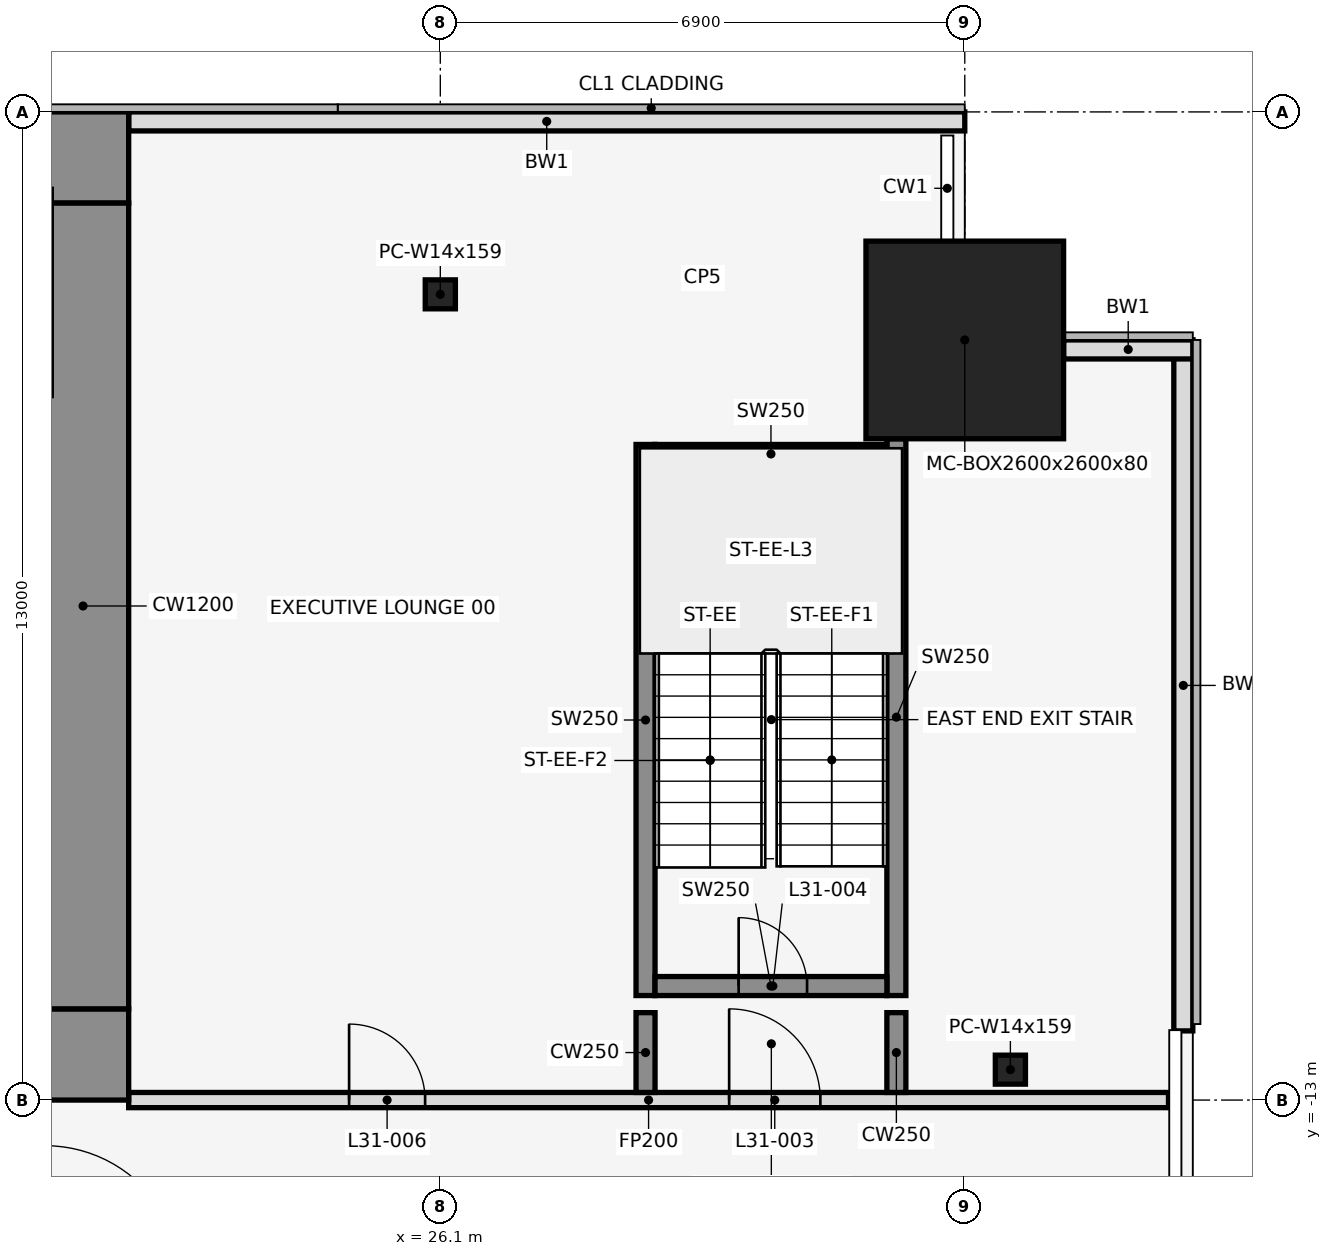
"""IFC4 building model, lengths in metres.
Left out: names, types, materials, properties, quantities, classifications, styles, units other than length and angle.
Written with IfcOpenShell. Run it as: python <this file> out.ifc"""

import sys

from ifc_helpers import new_model, si_unit, direction, frame, frame_2d, origin, origin_2d, place, context, subcontext, project, spatial, rectangle, hollow_rectangle, i_section, extrude, element, fill, save


model = new_model("IFC4")
c1 = context("Model", 3, precision=1e-05, world=origin(), true_north=direction((0.0, 1.0)))
c2 = subcontext(c1, "Body", "Model", "MODEL_VIEW")
j1 = project(units=[si_unit("LENGTHUNIT", "METRE"), si_unit("PLANEANGLEUNIT", "RADIAN")], contexts=[c1])
p1 = place(None, origin())
s1 = spatial("IfcSite", under=j1, at=p1, CompositionType="ELEMENT")
p2 = place(p1, origin())
s2 = spatial("IfcBuilding", under=s1, at=p2, CompositionType="ELEMENT")
p3 = place(p2, frame((0.0, 0.0, 144.5)))
s3 = spatial("IfcBuildingStorey", under=s2, at=p3, CompositionType="ELEMENT", Elevation=144.5)
p4 = place(p3, frame((26.1, -2.4, 0.0), z_axis=(0.0, 0.0, 1.0), x_axis=(1.0, 0.0, 0.0)))
e1 = element("IfcColumn", 1, at=p4, inside=s3, PredefinedType="COLUMN", context=c2, shape_type="SweptSolid", body=[
    extrude(i_section(OverallWidth=0.396, OverallDepth=0.381, WebThickness=0.019, FlangeThickness=0.03, at=origin_2d()), origin(), (0.0, 0.0, 1.0), 4.1),
])
p5 = place(p3, frame((33.0, -3.0, 0.0), z_axis=(0.0, 0.0, 1.0), x_axis=(1.0, 0.0, 0.0)))
e2 = element("IfcColumn", 2, at=p5, inside=s3, PredefinedType="COLUMN", context=c2, shape_type="SweptSolid", body=[
    extrude(hollow_rectangle(XDim=2.6, YDim=2.6, WallThickness=0.08, at=origin_2d()), origin(), (0.0, 0.0, 1.0), 4.1),
])
p6 = place(p3, frame((33.6, -12.6, 0.0), z_axis=(0.0, 0.0, 1.0), x_axis=(1.0, 0.0, 0.0)))
e3 = element("IfcColumn", 3, at=p6, inside=s3, PredefinedType="COLUMN", context=c2, shape_type="SweptSolid", body=[
    extrude(i_section(OverallWidth=0.396, OverallDepth=0.381, WebThickness=0.019, FlangeThickness=0.03, at=origin_2d()), origin(), (0.0, 0.0, 1.0), 4.1),
])
p7 = place(p3, frame((33.0, -0.125, 0.0), z_axis=(0.0, 0.0, 1.0), x_axis=(-1.0, 0.0, 0.0)))
e4 = element("IfcWall", 4, at=p7, inside=s3, PredefinedType="STANDARD", context=c2, shape_type="SweptSolid", body=[
    extrude(rectangle(XDim=11.0, YDim=0.25, at=frame_2d((5.5, 0.0))), origin(), (0.0, 0.0, 1.0), 3.95),
])
p8 = place(p3, frame((35.875, -12.09, 0.0), z_axis=(0.0, 0.0, 1.0), x_axis=(0.0, 1.0, 0.0)))
e5 = element("IfcWall", 5, at=p8, inside=s3, PredefinedType="STANDARD", context=c2, shape_type="SweptSolid", body=[
    extrude(rectangle(XDim=9.09, YDim=0.25, at=frame_2d((4.545, 0.0))), origin(), (0.0, 0.0, 1.0), 3.95),
])
p9 = place(p3, frame((36.0, -3.125, 0.0), z_axis=(0.0, 0.0, 1.0), x_axis=(-1.0, 0.0, 0.0)))
e6 = element("IfcWall", 6, at=p9, inside=s3, PredefinedType="STANDARD", context=c2, shape_type="SweptSolid", body=[
    extrude(rectangle(XDim=1.7, YDim=0.25, at=frame_2d((0.85, 0.0))), origin(), (0.0, 0.0, 1.0), 3.95),
])
p10 = place(p3, frame((28.8, -11.625, 0.0), z_axis=(0.0, 0.0, 1.0), x_axis=(0.0, 1.0, 0.0)))
e7 = element("IfcWall", 7, at=p10, inside=s3, PredefinedType="SHEAR", context=c2, shape_type="SweptSolid", body=[
    extrude(rectangle(XDim=7.25, YDim=0.25, at=frame_2d((3.625, 0.0))), origin(), (0.0, 0.0, 1.0), 4.1),
])
p11 = place(p3, frame((32.1, -11.625, 0.0), z_axis=(0.0, 0.0, 1.0), x_axis=(0.0, 1.0, 0.0)))
e8 = element("IfcWall", 8, at=p11, inside=s3, PredefinedType="SHEAR", context=c2, shape_type="SweptSolid", body=[
    extrude(rectangle(XDim=7.325, YDim=0.25, at=frame_2d((3.663, 0.0))), origin(), (0.0, 0.0, 1.0), 4.1),
])
p12 = place(p3, frame((28.925, -11.5, 0.0), z_axis=(0.0, 0.0, 1.0), x_axis=(1.0, 0.0, 0.0)))
e9 = element("IfcWall", 9, at=p12, inside=s3, PredefinedType="SHEAR", context=c2, shape_type="SweptSolid", body=[
    extrude(rectangle(XDim=3.05, YDim=0.25, at=frame_2d((1.525, 0.0))), origin(), (0.0, 0.0, 1.0), 4.1),
])
p13 = place(p12, frame((1.1, 0.0, 0.0)))
e10 = element("IfcOpeningElement", 10, at=p13, cuts=e9, PredefinedType="OPENING", context=c2, shape_type="SweptSolid", body=[
    extrude(rectangle(XDim=0.9, YDim=2.1, at=frame_2d((0.45, 1.05))), frame((0.0, 0.137, 0.0), z_axis=(0.0, -1.0, 0.0), x_axis=(1.0, 0.0, 0.0)), (0.0, 0.0, 1.0), 0.274),
])
p14 = place(p3, frame((28.925, -4.5, 0.0), z_axis=(0.0, 0.0, 1.0), x_axis=(1.0, 0.0, 0.0)))
e11 = element("IfcWall", 11, at=p14, inside=s3, PredefinedType="SHEAR", context=c2, shape_type="SweptSolid", body=[
    extrude(rectangle(XDim=3.05, YDim=0.25, at=frame_2d((1.525, 0.0))), origin(), (0.0, 0.0, 1.0), 4.1),
])
p15 = place(p3, frame((22.0, -13.0, 0.0), z_axis=(0.0, 0.0, 1.0), x_axis=(1.0, 0.0, 0.0)))
e12 = element("IfcWall", 12, at=p15, inside=s3, PredefinedType="PARTITIONING", context=c2, shape_type="SweptSolid", body=[
    extrude(rectangle(XDim=13.68, YDim=0.2, at=frame_2d((6.84, 0.0))), origin(), (0.0, 0.0, 1.0), 2.84),
])
p16 = place(p15, frame((7.9, 0.0, 0.0)))
e13 = element("IfcOpeningElement", 13, at=p16, cuts=e12, PredefinedType="OPENING", context=c2, shape_type="SweptSolid", body=[
    extrude(rectangle(XDim=1.2, YDim=2.1, at=frame_2d((0.6, 1.05))), frame((0.0, 0.112, 0.0), z_axis=(0.0, -1.0, 0.0), x_axis=(1.0, 0.0, 0.0)), (0.0, 0.0, 1.0), 0.224),
])
p17 = place(p15, frame((2.9, 0.0, 0.0)))
e14 = element("IfcOpeningElement", 14, at=p17, cuts=e12, PredefinedType="OPENING", context=c2, shape_type="SweptSolid", body=[
    extrude(rectangle(XDim=1.0, YDim=2.1, at=frame_2d((0.5, 1.05))), frame((0.0, 0.112, 0.0), z_axis=(0.0, -1.0, 0.0), x_axis=(1.0, 0.0, 0.0)), (0.0, 0.0, 1.0), 0.224),
])
for number, where, z_axis, x_axis in (
    (15, (28.8, -12.9, 0.0), (0.0, 0.0, 1.0), (0.0, 1.0, 0.0)),
    (16, (32.1, -12.9, 0.0), (0.0, 0.0, 1.0), (0.0, 1.0, 0.0)),
):
    element("IfcWall", number, at=place(p3, frame(where, z_axis=z_axis, x_axis=x_axis)), inside=s3, PredefinedType="SHEAR", context=c2, shape_type="SweptSolid", body=[
        extrude(rectangle(XDim=1.05, YDim=0.25, at=frame_2d((0.525, 0.0))), origin(), (0.0, 0.0, 1.0), 4.1),
    ])
p18 = place(p3, frame((-22.0, -0.6, 0.0), z_axis=(0.0, 0.0, 1.0), x_axis=(1.0, 0.0, 0.0)))
e17 = element("IfcWall", 17, at=p18, inside=s3, PredefinedType="SHEAR", context=c2, shape_type="SweptSolid", body=[
    extrude(rectangle(XDim=44.0, YDim=1.2, at=frame_2d((22.0, 0.0))), origin(), (0.0, 0.0, 1.0), 4.1),
])
p19 = place(p18, frame((18.55, 0.0, 0.0)))
e18 = element("IfcOpeningElement", 18, at=p19, cuts=e17, PredefinedType="OPENING", context=c2, shape_type="SweptSolid", body=[
    extrude(rectangle(XDim=0.9, YDim=2.1, at=frame_2d((0.45, 1.05))), frame((0.0, 0.612, 0.0), z_axis=(0.0, -1.0, 0.0), x_axis=(1.0, 0.0, 0.0)), (0.0, 0.0, 1.0), 1.224),
])
p20 = place(p18, frame((24.55, 0.0, 0.0)))
e19 = element("IfcOpeningElement", 19, at=p20, cuts=e17, PredefinedType="OPENING", context=c2, shape_type="SweptSolid", body=[
    extrude(rectangle(XDim=0.9, YDim=2.1, at=frame_2d((0.45, 1.05))), frame((0.0, 0.612, 0.0), z_axis=(0.0, -1.0, 0.0), x_axis=(1.0, 0.0, 0.0)), (0.0, 0.0, 1.0), 1.224),
])
p21 = place(p3, frame((-22.0, -12.4, 0.0), z_axis=(0.0, 0.0, 1.0), x_axis=(1.0, 0.0, 0.0)))
e20 = element("IfcWall", 20, at=p21, inside=s3, PredefinedType="SHEAR", context=c2, shape_type="SweptSolid", body=[
    extrude(rectangle(XDim=44.0, YDim=1.2, at=frame_2d((22.0, 0.0))), origin(), (0.0, 0.0, 1.0), 4.1),
])
p22 = place(p21, frame((2.2, 0.0, 0.0)))
e21 = element("IfcOpeningElement", 21, at=p22, cuts=e20, PredefinedType="OPENING", context=c2, shape_type="SweptSolid", body=[
    extrude(rectangle(XDim=1.2, YDim=2.1, at=frame_2d((0.6, 1.05))), frame((0.0, 0.612, 0.0), z_axis=(0.0, -1.0, 0.0), x_axis=(1.0, 0.0, 0.0)), (0.0, 0.0, 1.0), 1.224),
])
p23 = place(p21, frame((21.4, 0.0, 0.0)))
e22 = element("IfcOpeningElement", 22, at=p23, cuts=e20, PredefinedType="OPENING", context=c2, shape_type="SweptSolid", body=[
    extrude(rectangle(XDim=1.2, YDim=2.1, at=frame_2d((0.6, 1.05))), frame((0.0, 0.612, 0.0), z_axis=(0.0, -1.0, 0.0), x_axis=(1.0, 0.0, 0.0)), (0.0, 0.0, 1.0), 1.224),
])
p24 = place(p21, frame((40.6, 0.0, 0.0)))
e23 = element("IfcOpeningElement", 23, at=p24, cuts=e20, PredefinedType="OPENING", context=c2, shape_type="SweptSolid", body=[
    extrude(rectangle(XDim=1.2, YDim=2.1, at=frame_2d((0.6, 1.05))), frame((0.0, 0.612, 0.0), z_axis=(0.0, -1.0, 0.0), x_axis=(1.0, 0.0, 0.0)), (0.0, 0.0, 1.0), 1.224),
])
p25 = place(p21, frame((16.0, 0.0, 0.0)))
e24 = element("IfcOpeningElement", 24, at=p25, cuts=e20, PredefinedType="OPENING", context=c2, shape_type="SweptSolid", body=[
    extrude(rectangle(XDim=1.8, YDim=2.1, at=frame_2d((0.9, 1.05))), frame((0.0, 0.612, 0.0), z_axis=(0.0, -1.0, 0.0), x_axis=(1.0, 0.0, 0.0)), (0.0, 0.0, 1.0), 1.224),
])
p26 = place(p21, frame((6.3, 0.0, 0.0)))
e25 = element("IfcOpeningElement", 25, at=p26, cuts=e20, PredefinedType="OPENING", context=c2, shape_type="SweptSolid", body=[
    extrude(rectangle(XDim=1.2, YDim=2.1, at=frame_2d((0.6, 1.05))), frame((0.0, 0.612, 0.0), z_axis=(0.0, -1.0, 0.0), x_axis=(1.0, 0.0, 0.0)), (0.0, 0.0, 1.0), 1.224),
])
p27 = place(p21, frame((26.2, 0.0, 0.0)))
e26 = element("IfcOpeningElement", 26, at=p27, cuts=e20, PredefinedType="OPENING", context=c2, shape_type="SweptSolid", body=[
    extrude(rectangle(XDim=1.8, YDim=2.1, at=frame_2d((0.9, 1.05))), frame((0.0, 0.612, 0.0), z_axis=(0.0, -1.0, 0.0), x_axis=(1.0, 0.0, 0.0)), (0.0, 0.0, 1.0), 1.224),
])
p28 = place(p21, frame((36.5, 0.0, 0.0)))
e27 = element("IfcOpeningElement", 27, at=p28, cuts=e20, PredefinedType="OPENING", context=c2, shape_type="SweptSolid", body=[
    extrude(rectangle(XDim=1.2, YDim=2.1, at=frame_2d((0.6, 1.05))), frame((0.0, 0.612, 0.0), z_axis=(0.0, -1.0, 0.0), x_axis=(1.0, 0.0, 0.0)), (0.0, 0.0, 1.0), 1.224),
])
p29 = place(p3, frame((21.4, -11.8, 0.0), z_axis=(0.0, 0.0, 1.0), x_axis=(0.0, 1.0, 0.0)))
e28 = element("IfcWall", 28, at=p29, inside=s3, PredefinedType="SHEAR", context=c2, shape_type="SweptSolid", body=[
    extrude(rectangle(XDim=10.6, YDim=1.2, at=frame_2d((5.3, 0.0))), origin(), (0.0, 0.0, 1.0), 4.1),
])
p30 = place(p16, origin())
e29 = element("IfcDoor", 29, at=p30, inside=s3, OperationType="SINGLE_SWING_RIGHT", PredefinedType="DOOR", context=c2, shape_type="SweptSolid", body=[
    extrude(rectangle(XDim=1.2, YDim=2.1, at=frame_2d((0.6, 1.05))), frame((0.0, 0.025, 0.0), z_axis=(0.0, -1.0, 0.0), x_axis=(1.0, 0.0, 0.0)), (0.0, 0.0, 1.0), 0.05),
])
fill(e13, e29)
p31 = place(p13, origin())
e30 = element("IfcDoor", 30, at=p31, inside=s3, OperationType="SINGLE_SWING_LEFT", PredefinedType="DOOR", context=c2, shape_type="SweptSolid", body=[
    extrude(rectangle(XDim=0.9, YDim=2.1, at=frame_2d((0.45, 1.05))), frame((0.0, 0.025, 0.0), z_axis=(0.0, -1.0, 0.0), x_axis=(1.0, 0.0, 0.0)), (0.0, 0.0, 1.0), 0.05),
])
fill(e10, e30)
p32 = place(p17, origin())
e31 = element("IfcDoor", 31, at=p32, inside=s3, OperationType="SINGLE_SWING_RIGHT", PredefinedType="DOOR", context=c2, shape_type="SweptSolid", body=[
    extrude(rectangle(XDim=1.0, YDim=2.1, at=frame_2d((0.5, 1.05))), frame((0.0, 0.025, 0.0), z_axis=(0.0, -1.0, 0.0), x_axis=(1.0, 0.0, 0.0)), (0.0, 0.0, 1.0), 0.05),
])
fill(e14, e31)
save(model, sys.argv[1])
